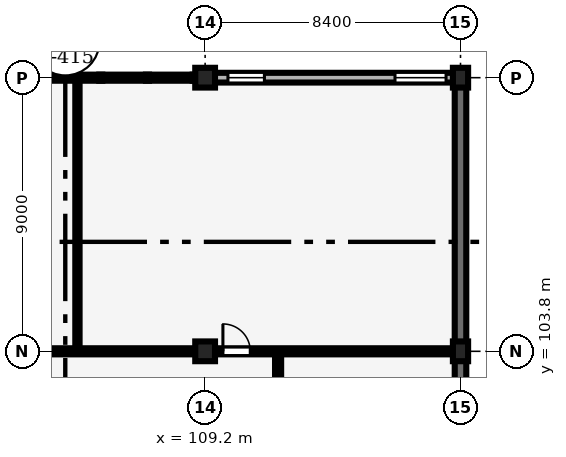
"""IFC4 building model, lengths in metres.
Left out: names, types, materials, properties, quantities, classifications, styles, units other than length and angle.
Written with IfcOpenShell. Run it as: python <this file> out.ifc"""

import sys

from ifc_helpers import new_model, si_unit, direction, frame, frame_2d, origin, origin_2d, place, context, subcontext, project, spatial, rectangle, extrude, element, fill, save


model = new_model("IFC4")
c1 = context("Model", 3, precision=1e-05, world=origin(), true_north=direction((0.0, 1.0)))
c2 = subcontext(c1, "Body", "Model", "MODEL_VIEW")
j1 = project(units=[si_unit("LENGTHUNIT", "METRE"), si_unit("PLANEANGLEUNIT", "RADIAN")], contexts=[c1])
p1 = place(None, origin())
s1 = spatial("IfcSite", under=j1, at=p1, CompositionType="ELEMENT")
p2 = place(p1, origin())
s2 = spatial("IfcBuilding", under=s1, at=p2, CompositionType="ELEMENT")
p3 = place(p2, frame((0.0, 0.0, 4.8)))
s3 = spatial("IfcBuildingStorey", under=s2, at=p3, CompositionType="ELEMENT", Elevation=4.8)
for number, where, z_axis, x_axis in (
    (1, (109.2, 103.8, 0.0), (0.0, 0.0, 1.0), (1.0, 0.0, 0.0)),
    (2, (109.2, 112.8, 0.0), (0.0, 0.0, 1.0), (1.0, 0.0, 0.0)),
):
    element("IfcColumn", number, at=place(p3, frame(where, z_axis=z_axis, x_axis=x_axis)), inside=s3, PredefinedType="COLUMN", context=c2, shape_type="SweptSolid", body=[
        extrude(rectangle(XDim=0.65, YDim=0.65, at=origin_2d()), origin(), (0.0, 0.0, 1.0), 4.2),
    ])
for number, where, z_axis, x_axis in (
    (3, (117.6, 103.8, 0.0), (0.0, 0.0, 1.0), (1.0, 0.0, 0.0)),
    (4, (117.6, 112.8, 0.0), (0.0, 0.0, 1.0), (1.0, 0.0, 0.0)),
):
    element("IfcColumn", number, at=place(p3, frame(where, z_axis=z_axis, x_axis=x_axis)), inside=s3, PredefinedType="COLUMN", context=c2, shape_type="SweptSolid", body=[
        extrude(rectangle(XDim=0.5, YDim=0.65, at=origin_2d()), origin(), (0.0, 0.0, 1.0), 4.2),
    ])
for number, where, z_axis, x_axis in (
    (5, (117.6, 95.1, 0.0), (0.0, 0.0, 1.0), (0.0, 1.0, 0.0)),
    (6, (117.6, 104.1, 0.0), (0.0, 0.0, 1.0), (0.0, 1.0, 0.0)),
):
    element("IfcWall", number, at=place(p3, frame(where, z_axis=z_axis, x_axis=x_axis)), inside=s3, PredefinedType="SHEAR", context=c2, shape_type="SweptSolid", body=[
        extrude(rectangle(XDim=8.4, YDim=0.38, at=frame_2d((4.2, 0.0))), origin(), (0.0, 0.0, 1.0), 2.97),
    ])
p4 = place(p3, frame((109.5, 112.8, 0.0), z_axis=(0.0, 0.0, 1.0), x_axis=(1.0, 0.0, 0.0)))
e7 = element("IfcWall", 7, at=p4, inside=s3, PredefinedType="SOLIDWALL", context=c2, shape_type="SweptSolid", body=[
    extrude(rectangle(XDim=7.875, YDim=0.32, at=frame_2d((3.938, 0.0))), origin(), (0.0, 0.0, 1.0), 3.12),
])
p5 = place(p4, frame((0.45, 0.0, 0.9)))
e8 = element("IfcOpeningElement", 8, at=p5, cuts=e7, PredefinedType="OPENING", context=c2, shape_type="SweptSolid", body=[
    extrude(rectangle(XDim=1.2, YDim=1.8, at=frame_2d((0.6, 0.9))), frame((0.0, 0.17, 0.0), z_axis=(0.0, -1.0, 0.0), x_axis=(1.0, 0.0, 0.0)), (0.0, 0.0, 1.0), 0.34),
])
p6 = place(p4, frame((5.945, 0.0, 0.9)))
e9 = element("IfcOpeningElement", 9, at=p6, cuts=e7, PredefinedType="OPENING", context=c2, shape_type="SweptSolid", body=[
    extrude(rectangle(XDim=1.68, YDim=2.07, at=frame_2d((0.84, 1.035))), frame((0.0, 0.17, 0.0), z_axis=(0.0, -1.0, 0.0), x_axis=(1.0, 0.0, 0.0)), (0.0, 0.0, 1.0), 0.34),
])
p7 = place(p3, frame((111.6, 101.01, 0.0), z_axis=(0.0, 0.0, 1.0), x_axis=(0.0, 1.0, 0.0)))
e10 = element("IfcWall", 10, at=p7, inside=s3, PredefinedType="PARTITIONING", context=c2, shape_type="SweptSolid", body=[
    extrude(rectangle(XDim=2.78, YDim=0.2, at=frame_2d((1.39, 0.0))), origin(), (0.0, 0.0, 1.0), 3.9),
])
p8 = place(p7, frame((0.94, 0.0, 0.0)))
e11 = element("IfcOpeningElement", 11, at=p8, cuts=e10, PredefinedType="OPENING", context=c2, shape_type="SweptSolid", body=[
    extrude(rectangle(XDim=0.9, YDim=2.1, at=frame_2d((0.45, 1.05))), frame((0.0, 0.11, 0.0), z_axis=(0.0, -1.0, 0.0), x_axis=(1.0, 0.0, 0.0)), (0.0, 0.0, 1.0), 0.22),
])
p9 = place(p3, frame((105.0, 103.905, 0.0), z_axis=(0.0, 0.0, 1.0), x_axis=(0.0, 1.0, 0.0)))
e12 = element("IfcWall", 12, at=p9, inside=s3, PredefinedType="PARTITIONING", context=c2, shape_type="SweptSolid", body=[
    extrude(rectangle(XDim=8.79, YDim=0.14, at=frame_2d((4.395, 0.0))), origin(), (0.0, 0.0, 1.0), 3.9),
])
p10 = place(p3, frame((101.135, 103.8, 0.0), z_axis=(0.0, 0.0, 1.0), x_axis=(1.0, 0.0, 0.0)))
e13 = element("IfcWall", 13, at=p10, inside=s3, PredefinedType="PARTITIONING", context=c2, shape_type="SweptSolid", body=[
    extrude(rectangle(XDim=7.73, YDim=0.2, at=frame_2d((3.865, 0.0))), origin(), (0.0, 0.0, 1.0), 3.12),
])
p11 = place(p3, frame((109.535, 103.8, 0.0), z_axis=(0.0, 0.0, 1.0), x_axis=(1.0, 0.0, 0.0)))
e14 = element("IfcWall", 14, at=p11, inside=s3, PredefinedType="PARTITIONING", context=c2, shape_type="SweptSolid", body=[
    extrude(rectangle(XDim=7.87, YDim=0.2, at=frame_2d((3.935, 0.0))), origin(), (0.0, 0.0, 1.0), 3.17),
])
p12 = place(p11, frame((0.25, 0.0, 0.0)))
e15 = element("IfcOpeningElement", 15, at=p12, cuts=e14, PredefinedType="OPENING", context=c2, shape_type="SweptSolid", body=[
    extrude(rectangle(XDim=0.9, YDim=2.1, at=frame_2d((0.45, 1.05))), frame((0.0, 0.11, 0.0), z_axis=(0.0, -1.0, 0.0), x_axis=(1.0, 0.0, 0.0)), (0.0, 0.0, 1.0), 0.22),
])
p13 = place(p5, origin())
e16 = element("IfcWindow", 16, at=p13, inside=s3, PartitioningType="SINGLE_PANEL", PredefinedType="WINDOW", context=c2, shape_type="SweptSolid", body=[
    extrude(rectangle(XDim=1.2, YDim=1.8, at=frame_2d((0.6, 0.9))), frame((0.0, 0.03, 0.0), z_axis=(0.0, -1.0, 0.0), x_axis=(1.0, 0.0, 0.0)), (0.0, 0.0, 1.0), 0.06),
])
fill(e8, e16)
p14 = place(p6, origin())
e17 = element("IfcWindow", 17, at=p14, inside=s3, PartitioningType="SINGLE_PANEL", PredefinedType="WINDOW", context=c2, shape_type="SweptSolid", body=[
    extrude(rectangle(XDim=1.68, YDim=2.07, at=frame_2d((0.84, 1.035))), frame((0.0, 0.03, 0.0), z_axis=(0.0, -1.0, 0.0), x_axis=(1.0, 0.0, 0.0)), (0.0, 0.0, 1.0), 0.06),
])
fill(e9, e17)
p15 = place(p12, origin())
e18 = element("IfcDoor", 18, at=p15, inside=s3, OperationType="SINGLE_SWING_LEFT", PredefinedType="DOOR", context=c2, shape_type="SweptSolid", body=[
    extrude(rectangle(XDim=0.9, YDim=2.1, at=frame_2d((0.45, 1.05))), frame((0.0, 0.025, 0.0), z_axis=(0.0, -1.0, 0.0), x_axis=(1.0, 0.0, 0.0)), (0.0, 0.0, 1.0), 0.05),
])
fill(e15, e18)
save(model, sys.argv[1])
